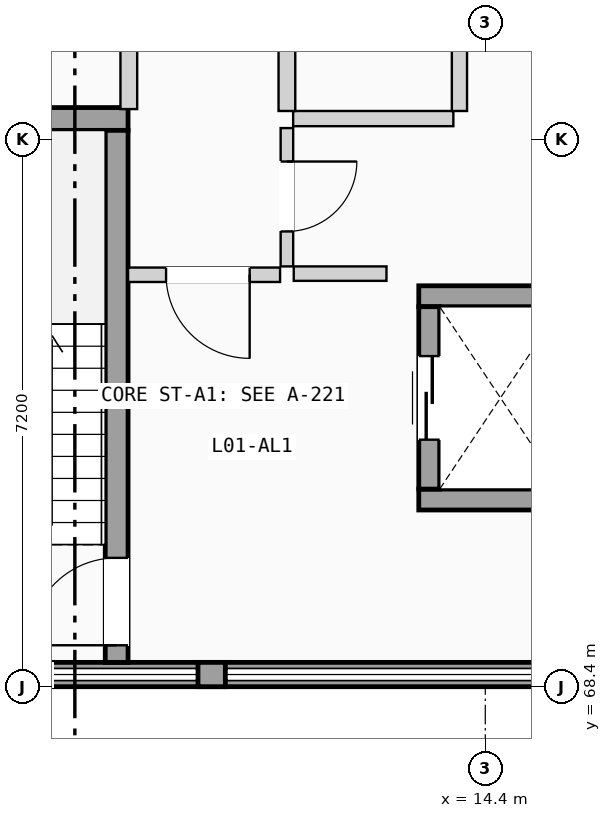
"""IFC4 building model, lengths in metres.
Left out: names, types, materials, properties, quantities, classifications, styles, units other than length and angle.
Written with IfcOpenShell. Run it as: python <this file> out.ifc"""

import sys

from ifc_helpers import new_model, si_unit, direction, frame, frame_2d, origin, place, context, subcontext, project, spatial, rectangle, extrude, element, fill, save


model = new_model("IFC4")
c1 = context("Model", 3, precision=1e-05, world=origin(), true_north=direction((0.0, 1.0)))
c2 = subcontext(c1, "Body", "Model", "MODEL_VIEW")
j1 = project(units=[si_unit("LENGTHUNIT", "METRE"), si_unit("PLANEANGLEUNIT", "RADIAN")], contexts=[c1])
p1 = place(None, origin())
s1 = spatial("IfcSite", under=j1, at=p1, CompositionType="ELEMENT")
p2 = place(p1, origin())
s2 = spatial("IfcBuilding", under=s1, at=p2, CompositionType="ELEMENT")
p3 = place(p2, frame((0.0, 0.0, 4.9)))
s3 = spatial("IfcBuildingStorey", under=s2, at=p3, CompositionType="ELEMENT", Elevation=4.9)
p4 = place(p3, frame((0.0, 68.56, 0.0), z_axis=(0.0, 0.0, 1.0), x_axis=(1.0, 0.0, 0.0)))
e1 = element("IfcWall", 1, at=p4, inside=s3, PredefinedType="SOLIDWALL", context=c2, shape_type="SweptSolid", body=[
    extrude(rectangle(XDim=21.6, YDim=0.32, at=frame_2d((10.8, 0.0))), origin(), (0.0, 0.0, 1.0), 1.11),
])
p5 = place(p3, frame((10.62, 68.56, 1.11), z_axis=(0.0, 0.0, 1.0), x_axis=(1.0, 0.0, 0.0)))
e2 = element("IfcWall", 2, at=p5, inside=s3, PredefinedType="SOLIDWALL", context=c2, shape_type="SweptSolid", body=[
    extrude(rectangle(XDim=0.36, YDim=0.32, at=frame_2d((0.18, 0.0))), origin(), (0.0, 0.0, 1.0), 2.305),
])
p6 = place(p3, frame((5.775, 75.87, 0.0), z_axis=(0.0, 0.0, 1.0), x_axis=(1.0, 0.0, 0.0)))
e3 = element("IfcWall", 3, at=p6, inside=s3, PredefinedType="SHEAR", context=c2, shape_type="SweptSolid", body=[
    extrude(rectangle(XDim=3.925, YDim=0.3, at=frame_2d((1.962, 0.0))), origin(), (0.0, 0.0, 1.0), 3.415),
])
p7 = place(p3, frame((9.55, 68.72, 0.0), z_axis=(0.0, 0.0, 1.0), x_axis=(0.0, 1.0, 0.0)))
e4 = element("IfcWall", 4, at=p7, inside=s3, PredefinedType="SHEAR", context=c2, shape_type="SweptSolid", body=[
    extrude(rectangle(XDim=7.0, YDim=0.3, at=frame_2d((3.5, 0.0))), origin(), (0.0, 0.0, 1.0), 3.415),
])
p8 = place(p7, frame((0.225, 0.0, 0.0)))
e5 = element("IfcOpeningElement", 5, at=p8, cuts=e4, PredefinedType="OPENING", context=c2, shape_type="SweptSolid", body=[
    extrude(rectangle(XDim=1.15, YDim=2.12, at=frame_2d((0.575, 1.06))), frame((0.0, 0.16, 0.0), z_axis=(0.0, -1.0, 0.0), x_axis=(1.0, 0.0, 0.0)), (0.0, 0.0, 1.0), 0.32),
])
for number, where, z_axis, x_axis in (
    (6, (13.525, 70.863, 0.0), (0.0, 0.0, 1.0), (1.0, 0.0, 0.0)),
    (7, (13.525, 73.538, 0.0), (0.0, 0.0, 1.0), (1.0, 0.0, 0.0)),
):
    element("IfcWall", number, at=place(p3, frame(where, z_axis=z_axis, x_axis=x_axis)), inside=s3, PredefinedType="SHEAR", context=c2, shape_type="SweptSolid", body=[
        extrude(rectangle(XDim=2.15, YDim=0.275, at=frame_2d((1.075, 0.0))), origin(), (0.0, 0.0, 1.0), 3.415),
    ])
p9 = place(p3, frame((13.663, 71.0, 0.0), z_axis=(0.0, 0.0, 1.0), x_axis=(0.0, 1.0, 0.0)))
e8 = element("IfcWall", 8, at=p9, inside=s3, PredefinedType="SHEAR", context=c2, shape_type="SweptSolid", body=[
    extrude(rectangle(XDim=2.4, YDim=0.275, at=frame_2d((1.2, 0.0))), origin(), (0.0, 0.0, 1.0), 3.415),
])
p10 = place(p9, frame((0.65, 0.0, 0.0)))
e9 = element("IfcOpeningElement", 9, at=p10, cuts=e8, PredefinedType="OPENING", context=c2, shape_type="SweptSolid", body=[
    extrude(rectangle(XDim=1.1, YDim=2.15, at=frame_2d((0.55, 1.075))), frame((0.0, 0.147, 0.0), z_axis=(0.0, -1.0, 0.0), x_axis=(1.0, 0.0, 0.0)), (0.0, 0.0, 1.0), 0.295),
])
p11 = place(p3, frame((11.88, 73.835, 0.0), z_axis=(0.0, 0.0, 1.0), x_axis=(1.0, 0.0, 0.0)))
e10 = element("IfcWall", 10, at=p11, inside=s3, PredefinedType="PARTITIONING", context=c2, shape_type="SweptSolid", body=[
    extrude(rectangle(XDim=1.22, YDim=0.19, at=frame_2d((0.61, 0.0))), origin(), (0.0, 0.0, 1.0), 3.395),
])
p12 = place(p3, frame((9.7, 73.82, 0.0), z_axis=(0.0, 0.0, 1.0), x_axis=(1.0, 0.0, 0.0)))
e11 = element("IfcWall", 11, at=p12, inside=s3, PredefinedType="PARTITIONING", context=c2, shape_type="SweptSolid", body=[
    extrude(rectangle(XDim=2.0, YDim=0.19, at=frame_2d((1.0, 0.0))), origin(), (0.0, 0.0, 1.0), 3.395),
])
p13 = place(p12, frame((0.5, 0.0, 0.0)))
e12 = element("IfcOpeningElement", 12, at=p13, cuts=e11, PredefinedType="OPENING", context=c2, shape_type="SweptSolid", body=[
    extrude(rectangle(XDim=1.1, YDim=2.12, at=frame_2d((0.55, 1.06))), frame((0.0, 0.105, 0.0), z_axis=(0.0, -1.0, 0.0), x_axis=(1.0, 0.0, 0.0)), (0.0, 0.0, 1.0), 0.21),
])
p14 = place(p3, frame((11.79, 73.93, 0.0), z_axis=(0.0, 0.0, 1.0), x_axis=(0.0, 1.0, 0.0)))
e13 = element("IfcWall", 13, at=p14, inside=s3, PredefinedType="PARTITIONING", context=c2, shape_type="SweptSolid", body=[
    extrude(rectangle(XDim=1.82, YDim=0.165, at=frame_2d((0.91, 0.0))), origin(), (0.0, 0.0, 1.0), 3.395),
])
p15 = place(p14, frame((0.46, 0.0, 0.0)))
e14 = element("IfcOpeningElement", 14, at=p15, cuts=e13, PredefinedType="OPENING", context=c2, shape_type="SweptSolid", body=[
    extrude(rectangle(XDim=0.92, YDim=2.04, at=frame_2d((0.46, 1.02))), frame((0.0, 0.093, 0.0), z_axis=(0.0, -1.0, 0.0), x_axis=(1.0, 0.0, 0.0)), (0.0, 0.0, 1.0), 0.185),
])
p16 = place(p3, frame((11.872, 75.875, 0.0), z_axis=(0.0, 0.0, 1.0), x_axis=(1.0, 0.0, 0.0)))
e15 = element("IfcWall", 15, at=p16, inside=s3, PredefinedType="PLUMBINGWALL", context=c2, shape_type="SweptSolid", body=[
    extrude(rectangle(XDim=2.108, YDim=0.2, at=frame_2d((1.054, 0.0))), origin(), (0.0, 0.0, 1.0), 3.395),
])
p17 = place(p3, frame((9.71, 76.0, 0.0), z_axis=(0.0, 0.0, 1.0), x_axis=(0.0, 1.0, 0.0)))
e16 = element("IfcWall", 16, at=p17, inside=s3, PredefinedType="PLUMBINGWALL", context=c2, shape_type="SweptSolid", body=[
    extrude(rectangle(XDim=7.67, YDim=0.22, at=frame_2d((3.835, 0.0))), origin(), (0.0, 0.0, 1.0), 3.395),
])
p18 = place(p3, frame((11.79, 75.975, 0.0), z_axis=(0.0, 0.0, 1.0), x_axis=(0.0, 1.0, 0.0)))
e17 = element("IfcWall", 17, at=p18, inside=s3, PredefinedType="PLUMBINGWALL", context=c2, shape_type="SweptSolid", body=[
    extrude(rectangle(XDim=7.695, YDim=0.22, at=frame_2d((3.847, 0.0))), origin(), (0.0, 0.0, 1.0), 3.395),
])
p19 = place(p3, frame((14.06, 75.975, 0.0), z_axis=(0.0, 0.0, 1.0), x_axis=(0.0, 1.0, 0.0)))
e18 = element("IfcWall", 18, at=p19, inside=s3, PredefinedType="PLUMBINGWALL", context=c2, shape_type="SweptSolid", body=[
    extrude(rectangle(XDim=7.715, YDim=0.2, at=frame_2d((3.857, 0.0))), origin(), (0.0, 0.0, 1.0), 3.395),
])
p20 = place(p19, frame((3.435, 0.0, 0.0)))
e19 = element("IfcOpeningElement", 19, at=p20, cuts=e18, PredefinedType="OPENING", context=c2, shape_type="SweptSolid", body=[
    extrude(rectangle(XDim=0.85, YDim=2.01, at=frame_2d((0.425, 1.005))), frame((0.0, 0.11, 0.0), z_axis=(0.0, -1.0, 0.0), x_axis=(1.0, 0.0, 0.0)), (0.0, 0.0, 1.0), 0.22),
])
p21 = place(p8, origin())
e20 = element("IfcDoor", 20, at=p21, inside=s3, OperationType="SINGLE_SWING_LEFT", PredefinedType="DOOR", context=c2, shape_type="SweptSolid", body=[
    extrude(rectangle(XDim=1.15, YDim=2.12, at=frame_2d((0.575, 1.06))), frame((0.0, 0.025, 0.0), z_axis=(0.0, -1.0, 0.0), x_axis=(1.0, 0.0, 0.0)), (0.0, 0.0, 1.0), 0.05),
])
fill(e5, e20)
p22 = place(p10, origin())
e21 = element("IfcDoor", 21, at=p22, inside=s3, OperationType="SLIDING_TO_LEFT", PredefinedType="DOOR", context=c2, shape_type="SweptSolid", body=[
    extrude(rectangle(XDim=1.1, YDim=2.15, at=frame_2d((0.55, 1.075))), frame((0.0, 0.025, 0.0), z_axis=(0.0, -1.0, 0.0), x_axis=(1.0, 0.0, 0.0)), (0.0, 0.0, 1.0), 0.05),
])
fill(e9, e21)
p23 = place(p13, frame((1.1, 0.0, 0.0), z_axis=(0.0, 0.0, 1.0), x_axis=(-1.0, 0.0, 0.0)))
e22 = element("IfcDoor", 22, at=p23, inside=s3, OperationType="SINGLE_SWING_RIGHT", PredefinedType="DOOR", context=c2, shape_type="SweptSolid", body=[
    extrude(rectangle(XDim=1.1, YDim=2.12, at=frame_2d((0.55, 1.06))), frame((0.0, 0.025, 0.0), z_axis=(0.0, -1.0, 0.0), x_axis=(1.0, 0.0, 0.0)), (0.0, 0.0, 1.0), 0.05),
])
fill(e12, e22)
p24 = place(p15, frame((0.92, 0.0, 0.0), z_axis=(0.0, 0.0, 1.0), x_axis=(-1.0, 0.0, 0.0)))
e23 = element("IfcDoor", 23, at=p24, inside=s3, OperationType="SINGLE_SWING_RIGHT", PredefinedType="DOOR", context=c2, shape_type="SweptSolid", body=[
    extrude(rectangle(XDim=0.92, YDim=2.04, at=frame_2d((0.46, 1.02))), frame((0.0, 0.025, 0.0), z_axis=(0.0, -1.0, 0.0), x_axis=(1.0, 0.0, 0.0)), (0.0, 0.0, 1.0), 0.05),
])
fill(e14, e23)
save(model, sys.argv[1])
